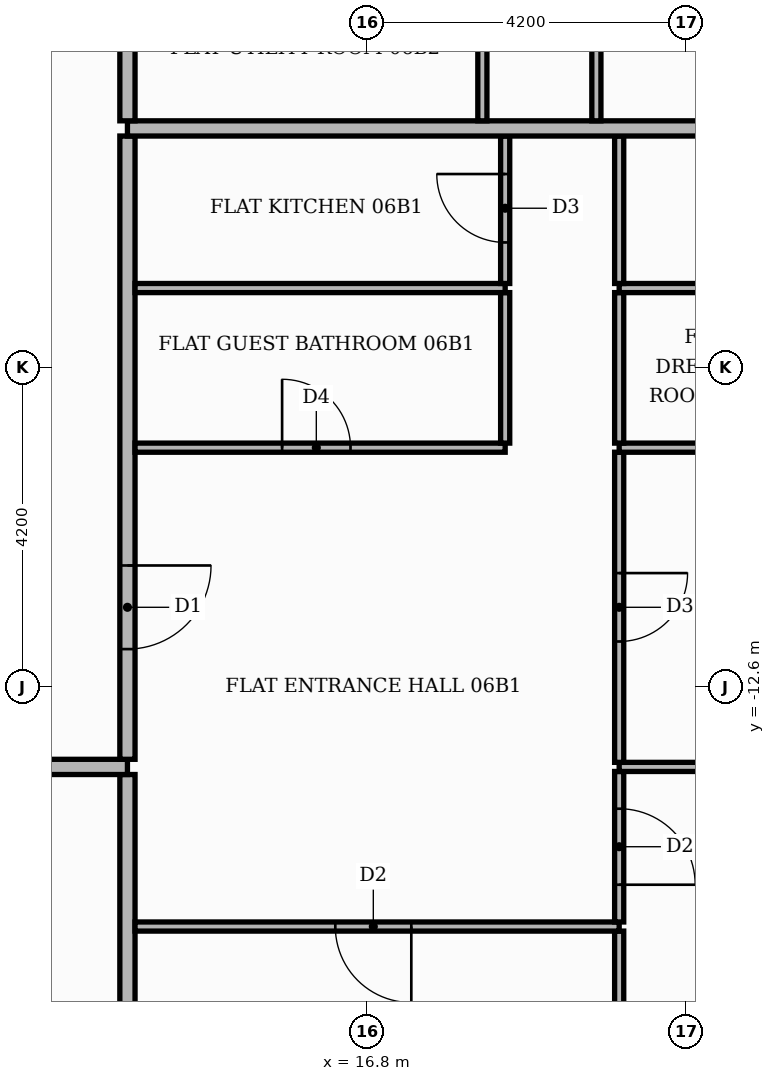
"""IFC4 building model, lengths in metres.
Left out: names, types, materials, properties, quantities, classifications, styles, units other than length and angle.
Written with IfcOpenShell. Run it as: python <this file> out.ifc"""

import sys

from ifc_helpers import new_model, si_unit, direction, frame, frame_2d, origin, place, context, subcontext, project, spatial, rectangle, extrude, element, fill, save


model = new_model("IFC4")
c1 = context("Model", 3, precision=1e-05, world=origin(), true_north=direction((0.0, 1.0)))
c2 = subcontext(c1, "Body", "Model", "MODEL_VIEW")
j1 = project(units=[si_unit("LENGTHUNIT", "METRE"), si_unit("PLANEANGLEUNIT", "RADIAN")], contexts=[c1])
p1 = place(None, origin())
s1 = spatial("IfcSite", under=j1, at=p1, CompositionType="ELEMENT")
p2 = place(p1, origin())
s2 = spatial("IfcBuilding", under=s1, at=p2, CompositionType="ELEMENT")
p3 = place(p2, frame((0.0, 0.0, 30.9)))
s3 = spatial("IfcBuildingStorey", under=s2, at=p3, CompositionType="ELEMENT", Elevation=30.9)
p4 = place(p3, frame((13.65, -25.42, 0.0), z_axis=(0.0, 0.0, 1.0), x_axis=(0.0, 1.0, 0.0)))
e1 = element("IfcWall", 1, at=p4, inside=s3, PredefinedType="PARTITIONING", context=c2, shape_type="SweptSolid", body=[
    extrude(rectangle(XDim=11.67, YDim=0.2, at=frame_2d((5.835, 0.0))), origin(), (0.0, 0.0, 1.0), 3.48),
])
p5 = place(p3, frame((20.12, -17.3, 0.0), z_axis=(0.0, 0.0, 1.0), x_axis=(0.0, 1.0, 0.0)))
e2 = element("IfcWall", 2, at=p5, inside=s3, PredefinedType="PARTITIONING", context=c2, shape_type="SweptSolid", body=[
    extrude(rectangle(XDim=1.49, YDim=0.12, at=frame_2d((0.745, 0.0))), origin(), (0.0, 0.0, 1.0), 3.48),
])
p6 = place(p3, frame((13.75, -15.75, 0.0), z_axis=(0.0, 0.0, 1.0), x_axis=(1.0, 0.0, 0.0)))
e3 = element("IfcWall", 3, at=p6, inside=s3, PredefinedType="PARTITIONING", context=c2, shape_type="SweptSolid", body=[
    extrude(rectangle(XDim=6.37, YDim=0.12, at=frame_2d((3.185, 0.0))), origin(), (0.0, 0.0, 1.0), 3.48),
])
p7 = place(p6, frame((2.635, 0.0, 0.0)))
e4 = element("IfcOpeningElement", 4, at=p7, cuts=e3, PredefinedType="OPENING", context=c2, shape_type="SweptSolid", body=[
    extrude(rectangle(XDim=1.0, YDim=2.1, at=frame_2d((0.5, 1.05))), frame((0.0, 0.07, 0.0), z_axis=(0.0, -1.0, 0.0), x_axis=(1.0, 0.0, 0.0)), (0.0, 0.0, 1.0), 0.14),
])
p8 = place(p3, frame((20.12, -15.69, 0.0), z_axis=(0.0, 0.0, 1.0), x_axis=(0.0, 1.0, 0.0)))
e5 = element("IfcWall", 5, at=p8, inside=s3, PredefinedType="PARTITIONING", context=c2, shape_type="SweptSolid", body=[
    extrude(rectangle(XDim=1.98, YDim=0.12, at=frame_2d((0.99, 0.0))), origin(), (0.0, 0.0, 1.0), 3.48),
])
p9 = place(p8, frame((0.49, 0.0, 0.0)))
e6 = element("IfcOpeningElement", 6, at=p9, cuts=e5, PredefinedType="OPENING", context=c2, shape_type="SweptSolid", body=[
    extrude(rectangle(XDim=1.0, YDim=2.1, at=frame_2d((0.5, 1.05))), frame((0.0, 0.07, 0.0), z_axis=(0.0, -1.0, 0.0), x_axis=(1.0, 0.0, 0.0)), (0.0, 0.0, 1.0), 0.14),
])
p10 = place(p3, frame((-25.42, -13.65, 0.0), z_axis=(0.0, 0.0, 1.0), x_axis=(1.0, 0.0, 0.0)))
e7 = element("IfcWall", 7, at=p10, inside=s3, PredefinedType="PARTITIONING", context=c2, shape_type="SweptSolid", body=[
    extrude(rectangle(XDim=39.07, YDim=0.2, at=frame_2d((19.535, 0.0))), origin(), (0.0, 0.0, 1.0), 3.48),
])
p11 = place(p10, frame((14.37, 0.0, 0.0)))
e8 = element("IfcOpeningElement", 8, at=p11, cuts=e7, PredefinedType="OPENING", context=c2, shape_type="SweptSolid", body=[
    extrude(rectangle(XDim=1.1, YDim=2.4, at=frame_2d((0.55, 1.2))), frame((0.0, 0.11, 0.0), z_axis=(0.0, -1.0, 0.0), x_axis=(1.0, 0.0, 0.0)), (0.0, 0.0, 1.0), 0.22),
])
p12 = place(p3, frame((20.12, -13.65, 0.0), z_axis=(0.0, 0.0, 1.0), x_axis=(1.0, 0.0, 0.0)))
e9 = element("IfcWall", 9, at=p12, inside=s3, PredefinedType="PARTITIONING", context=c2, shape_type="SweptSolid", body=[
    extrude(rectangle(XDim=5.3, YDim=0.12, at=frame_2d((2.65, 0.0))), origin(), (0.0, 0.0, 1.0), 3.48),
])
p13 = place(p3, frame((20.12, -13.59, 0.0), z_axis=(0.0, 0.0, 1.0), x_axis=(0.0, 1.0, 0.0)))
e10 = element("IfcWall", 10, at=p13, inside=s3, PredefinedType="PARTITIONING", context=c2, shape_type="SweptSolid", body=[
    extrude(rectangle(XDim=4.08, YDim=0.12, at=frame_2d((2.04, 0.0))), origin(), (0.0, 0.0, 1.0), 3.48),
])
p14 = place(p13, frame((1.59, 0.0, 0.0)))
e11 = element("IfcOpeningElement", 11, at=p14, cuts=e10, PredefinedType="OPENING", context=c2, shape_type="SweptSolid", body=[
    extrude(rectangle(XDim=0.9, YDim=2.1, at=frame_2d((0.45, 1.05))), frame((0.0, 0.07, 0.0), z_axis=(0.0, -1.0, 0.0), x_axis=(1.0, 0.0, 0.0)), (0.0, 0.0, 1.0), 0.14),
])
p15 = place(p3, frame((13.65, -13.55, 0.0), z_axis=(0.0, 0.0, 1.0), x_axis=(0.0, 1.0, 0.0)))
e12 = element("IfcWall", 12, at=p15, inside=s3, PredefinedType="PARTITIONING", context=c2, shape_type="SweptSolid", body=[
    extrude(rectangle(XDim=8.2, YDim=0.2, at=frame_2d((4.1, 0.0))), origin(), (0.0, 0.0, 1.0), 3.48),
])
p16 = place(p15, frame((1.45, 0.0, 0.0)))
e13 = element("IfcOpeningElement", 13, at=p16, cuts=e12, PredefinedType="OPENING", context=c2, shape_type="SweptSolid", body=[
    extrude(rectangle(XDim=1.1, YDim=2.4, at=frame_2d((0.55, 1.2))), frame((0.0, 0.11, 0.0), z_axis=(0.0, -1.0, 0.0), x_axis=(1.0, 0.0, 0.0)), (0.0, 0.0, 1.0), 0.22),
])
p17 = place(p3, frame((13.75, -9.45, 0.0), z_axis=(0.0, 0.0, 1.0), x_axis=(1.0, 0.0, 0.0)))
e14 = element("IfcWall", 14, at=p17, inside=s3, PredefinedType="PARTITIONING", context=c2, shape_type="SweptSolid", body=[
    extrude(rectangle(XDim=4.87, YDim=0.12, at=frame_2d((2.435, 0.0))), origin(), (0.0, 0.0, 1.0), 3.48),
])
p18 = place(p17, frame((1.935, 0.0, 0.0)))
e15 = element("IfcOpeningElement", 15, at=p18, cuts=e14, PredefinedType="OPENING", context=c2, shape_type="SweptSolid", body=[
    extrude(rectangle(XDim=0.9, YDim=2.1, at=frame_2d((0.45, 1.05))), frame((0.0, 0.07, 0.0), z_axis=(0.0, -1.0, 0.0), x_axis=(1.0, 0.0, 0.0)), (0.0, 0.0, 1.0), 0.14),
])
p19 = place(p3, frame((20.12, -9.45, 0.0), z_axis=(0.0, 0.0, 1.0), x_axis=(1.0, 0.0, 0.0)))
e16 = element("IfcWall", 16, at=p19, inside=s3, PredefinedType="PARTITIONING", context=c2, shape_type="SweptSolid", body=[
    extrude(rectangle(XDim=5.3, YDim=0.12, at=frame_2d((2.65, 0.0))), origin(), (0.0, 0.0, 1.0), 3.48),
])
p20 = place(p19, frame((2.35, 0.0, 0.0)))
e17 = element("IfcOpeningElement", 17, at=p20, cuts=e16, PredefinedType="OPENING", context=c2, shape_type="SweptSolid", body=[
    extrude(rectangle(XDim=0.9, YDim=2.1, at=frame_2d((0.45, 1.05))), frame((0.0, 0.07, 0.0), z_axis=(0.0, -1.0, 0.0), x_axis=(1.0, 0.0, 0.0)), (0.0, 0.0, 1.0), 0.14),
])
for number, where, z_axis, x_axis in (
    (18, (18.62, -9.39, 0.0), (0.0, 0.0, 1.0), (0.0, 1.0, 0.0)),
    (19, (20.12, -9.39, 0.0), (0.0, 0.0, 1.0), (0.0, 1.0, 0.0)),
):
    element("IfcWall", number, at=place(p3, frame(where, z_axis=z_axis, x_axis=x_axis)), inside=s3, PredefinedType="PARTITIONING", context=c2, shape_type="SweptSolid", body=[
        extrude(rectangle(XDim=1.98, YDim=0.12, at=frame_2d((0.99, 0.0))), origin(), (0.0, 0.0, 1.0), 3.48),
    ])
p21 = place(p3, frame((13.75, -7.35, 0.0), z_axis=(0.0, 0.0, 1.0), x_axis=(1.0, 0.0, 0.0)))
e20 = element("IfcWall", 20, at=p21, inside=s3, PredefinedType="PARTITIONING", context=c2, shape_type="SweptSolid", body=[
    extrude(rectangle(XDim=4.87, YDim=0.12, at=frame_2d((2.435, 0.0))), origin(), (0.0, 0.0, 1.0), 3.48),
])
p22 = place(p3, frame((20.12, -7.35, 0.0), z_axis=(0.0, 0.0, 1.0), x_axis=(1.0, 0.0, 0.0)))
e21 = element("IfcWall", 21, at=p22, inside=s3, PredefinedType="PARTITIONING", context=c2, shape_type="SweptSolid", body=[
    extrude(rectangle(XDim=5.3, YDim=0.12, at=frame_2d((2.65, 0.0))), origin(), (0.0, 0.0, 1.0), 3.48),
])
p23 = place(p22, frame((2.35, 0.0, 0.0)))
e22 = element("IfcOpeningElement", 22, at=p23, cuts=e21, PredefinedType="OPENING", context=c2, shape_type="SweptSolid", body=[
    extrude(rectangle(XDim=0.9, YDim=2.1, at=frame_2d((0.45, 1.05))), frame((0.0, 0.07, 0.0), z_axis=(0.0, -1.0, 0.0), x_axis=(1.0, 0.0, 0.0)), (0.0, 0.0, 1.0), 0.14),
])
p24 = place(p3, frame((18.62, -7.29, 0.0), z_axis=(0.0, 0.0, 1.0), x_axis=(0.0, 1.0, 0.0)))
e23 = element("IfcWall", 23, at=p24, inside=s3, PredefinedType="PARTITIONING", context=c2, shape_type="SweptSolid", body=[
    extrude(rectangle(XDim=1.94, YDim=0.12, at=frame_2d((0.97, 0.0))), origin(), (0.0, 0.0, 1.0), 3.48),
])
p25 = place(p24, frame((0.54, 0.0, 0.0)))
e24 = element("IfcOpeningElement", 24, at=p25, cuts=e23, PredefinedType="OPENING", context=c2, shape_type="SweptSolid", body=[
    extrude(rectangle(XDim=0.9, YDim=2.1, at=frame_2d((0.45, 1.05))), frame((0.0, 0.07, 0.0), z_axis=(0.0, -1.0, 0.0), x_axis=(1.0, 0.0, 0.0)), (0.0, 0.0, 1.0), 0.14),
])
p26 = place(p3, frame((20.12, -7.29, 0.0), z_axis=(0.0, 0.0, 1.0), x_axis=(0.0, 1.0, 0.0)))
e25 = element("IfcWall", 25, at=p26, inside=s3, PredefinedType="PARTITIONING", context=c2, shape_type="SweptSolid", body=[
    extrude(rectangle(XDim=1.94, YDim=0.12, at=frame_2d((0.97, 0.0))), origin(), (0.0, 0.0, 1.0), 3.48),
])
p27 = place(p3, frame((13.65, -5.25, 0.0), z_axis=(0.0, 0.0, 1.0), x_axis=(1.0, 0.0, 0.0)))
e26 = element("IfcWall", 26, at=p27, inside=s3, PredefinedType="PARTITIONING", context=c2, shape_type="SweptSolid", body=[
    extrude(rectangle(XDim=11.77, YDim=0.2, at=frame_2d((5.885, 0.0))), origin(), (0.0, 0.0, 1.0), 3.48),
])
p28 = place(p3, frame((13.65, -5.15, 0.0), z_axis=(0.0, 0.0, 1.0), x_axis=(0.0, 1.0, 0.0)))
e27 = element("IfcWall", 27, at=p28, inside=s3, PredefinedType="PARTITIONING", context=c2, shape_type="SweptSolid", body=[
    extrude(rectangle(XDim=18.7, YDim=0.2, at=frame_2d((9.35, 0.0))), origin(), (0.0, 0.0, 1.0), 3.48),
])
p29 = place(p28, frame((3.55, 0.0, 0.0)))
e28 = element("IfcOpeningElement", 28, at=p29, cuts=e27, PredefinedType="OPENING", context=c2, shape_type="SweptSolid", body=[
    extrude(rectangle(XDim=1.1, YDim=2.4, at=frame_2d((0.55, 1.2))), frame((0.0, 0.11, 0.0), z_axis=(0.0, -1.0, 0.0), x_axis=(1.0, 0.0, 0.0)), (0.0, 0.0, 1.0), 0.22),
])
p30 = place(p3, frame((18.32, -5.15, 0.0), z_axis=(0.0, 0.0, 1.0), x_axis=(0.0, 1.0, 0.0)))
e29 = element("IfcWall", 29, at=p30, inside=s3, PredefinedType="PARTITIONING", context=c2, shape_type="SweptSolid", body=[
    extrude(rectangle(XDim=1.94, YDim=0.12, at=frame_2d((0.97, 0.0))), origin(), (0.0, 0.0, 1.0), 3.48),
])
p31 = place(p3, frame((19.82, -5.15, 0.0), z_axis=(0.0, 0.0, 1.0), x_axis=(0.0, 1.0, 0.0)))
e30 = element("IfcWall", 30, at=p31, inside=s3, PredefinedType="PARTITIONING", context=c2, shape_type="SweptSolid", body=[
    extrude(rectangle(XDim=4.04, YDim=0.12, at=frame_2d((2.02, 0.0))), origin(), (0.0, 0.0, 1.0), 3.48),
])
p32 = place(p31, frame((1.5, 0.0, 0.0)))
e31 = element("IfcOpeningElement", 31, at=p32, cuts=e30, PredefinedType="OPENING", context=c2, shape_type="SweptSolid", body=[
    extrude(rectangle(XDim=1.0, YDim=2.1, at=frame_2d((0.5, 1.05))), frame((0.0, 0.07, 0.0), z_axis=(0.0, -1.0, 0.0), x_axis=(1.0, 0.0, 0.0)), (0.0, 0.0, 1.0), 0.14),
])
p33 = place(p16, frame((1.1, 0.0, 0.0), z_axis=(0.0, 0.0, 1.0), x_axis=(-1.0, 0.0, 0.0)))
e32 = element("IfcDoor", 32, at=p33, inside=s3, OperationType="SINGLE_SWING_RIGHT", PredefinedType="DOOR", context=c2, shape_type="SweptSolid", body=[
    extrude(rectangle(XDim=1.1, YDim=2.4, at=frame_2d((0.55, 1.2))), frame((0.0, 0.025, 0.0), z_axis=(0.0, -1.0, 0.0), x_axis=(1.0, 0.0, 0.0)), (0.0, 0.0, 1.0), 0.05),
])
fill(e13, e32)
p34 = place(p7, frame((1.0, 0.0, 0.0), z_axis=(0.0, 0.0, 1.0), x_axis=(-1.0, 0.0, 0.0)))
e33 = element("IfcDoor", 33, at=p34, inside=s3, OperationType="SINGLE_SWING_RIGHT", PredefinedType="DOOR", context=c2, shape_type="SweptSolid", body=[
    extrude(rectangle(XDim=1.0, YDim=2.1, at=frame_2d((0.5, 1.05))), frame((0.0, 0.025, 0.0), z_axis=(0.0, -1.0, 0.0), x_axis=(1.0, 0.0, 0.0)), (0.0, 0.0, 1.0), 0.05),
])
fill(e4, e33)
p35 = place(p18, origin())
e34 = element("IfcDoor", 34, at=p35, inside=s3, OperationType="SINGLE_SWING_LEFT", PredefinedType="DOOR", context=c2, shape_type="SweptSolid", body=[
    extrude(rectangle(XDim=0.9, YDim=2.1, at=frame_2d((0.45, 1.05))), frame((0.0, 0.025, 0.0), z_axis=(0.0, -1.0, 0.0), x_axis=(1.0, 0.0, 0.0)), (0.0, 0.0, 1.0), 0.05),
])
fill(e15, e34)
p36 = place(p25, origin())
e35 = element("IfcDoor", 35, at=p36, inside=s3, OperationType="SINGLE_SWING_RIGHT", PredefinedType="DOOR", context=c2, shape_type="SweptSolid", body=[
    extrude(rectangle(XDim=0.9, YDim=2.1, at=frame_2d((0.45, 1.05))), frame((0.0, 0.025, 0.0), z_axis=(0.0, -1.0, 0.0), x_axis=(1.0, 0.0, 0.0)), (0.0, 0.0, 1.0), 0.05),
])
fill(e24, e35)
p37 = place(p9, frame((1.0, 0.0, 0.0), z_axis=(0.0, 0.0, 1.0), x_axis=(-1.0, 0.0, 0.0)))
e36 = element("IfcDoor", 36, at=p37, inside=s3, OperationType="SINGLE_SWING_LEFT", PredefinedType="DOOR", context=c2, shape_type="SweptSolid", body=[
    extrude(rectangle(XDim=1.0, YDim=2.1, at=frame_2d((0.5, 1.05))), frame((0.0, 0.025, 0.0), z_axis=(0.0, -1.0, 0.0), x_axis=(1.0, 0.0, 0.0)), (0.0, 0.0, 1.0), 0.05),
])
fill(e6, e36)
p38 = place(p14, frame((0.9, 0.0, 0.0), z_axis=(0.0, 0.0, 1.0), x_axis=(-1.0, 0.0, 0.0)))
e37 = element("IfcDoor", 37, at=p38, inside=s3, OperationType="SINGLE_SWING_RIGHT", PredefinedType="DOOR", context=c2, shape_type="SweptSolid", body=[
    extrude(rectangle(XDim=0.9, YDim=2.1, at=frame_2d((0.45, 1.05))), frame((0.0, 0.025, 0.0), z_axis=(0.0, -1.0, 0.0), x_axis=(1.0, 0.0, 0.0)), (0.0, 0.0, 1.0), 0.05),
])
fill(e11, e37)
save(model, sys.argv[1])
